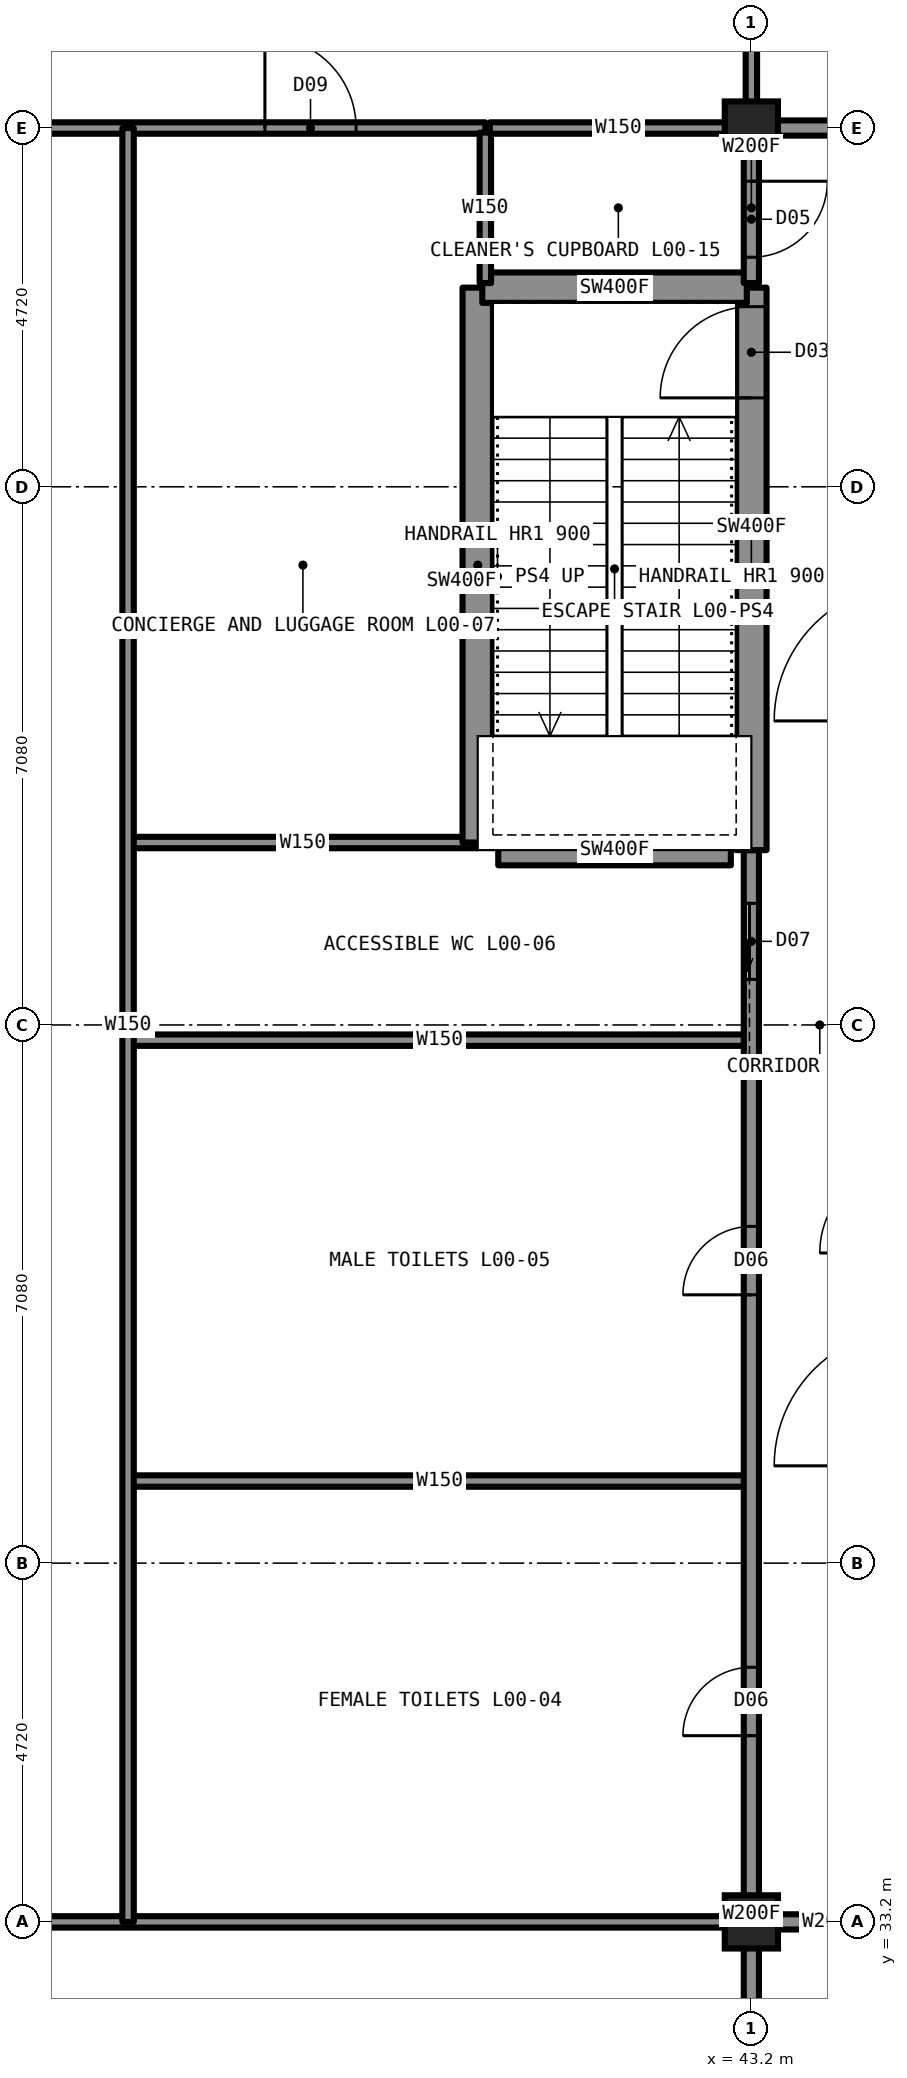
"""IFC4 building model, lengths in metres.
Left out: names, types, materials, properties, quantities, classifications, styles, units other than length and angle.
Written with IfcOpenShell. Run it as: python <this file> out.ifc"""

import sys

from ifc_helpers import new_model, si_unit, direction, frame, frame_2d, origin, origin_2d, place, context, subcontext, project, spatial, rectangle, hollow_rectangle, extrude, element, fill, save


model = new_model("IFC4")
c1 = context("Model", 3, precision=1e-05, world=origin(), true_north=direction((0.0, 1.0)))
c2 = subcontext(c1, "Body", "Model", "MODEL_VIEW")
j1 = project(units=[si_unit("LENGTHUNIT", "METRE"), si_unit("PLANEANGLEUNIT", "RADIAN")], contexts=[c1])
p1 = place(None, origin())
s1 = spatial("IfcSite", under=j1, at=p1, CompositionType="ELEMENT")
p2 = place(p1, origin())
s2 = spatial("IfcBuilding", under=s1, at=p2, CompositionType="ELEMENT")
p3 = place(p2, origin())
s3 = spatial("IfcBuildingStorey", under=s2, at=p3, CompositionType="ELEMENT", Elevation=0.0)
for number, where, z_axis, x_axis in (
    (1, (43.2, 33.2, 0.0), (0.0, 0.0, 1.0), (1.0, 0.0, 0.0)),
    (2, (43.2, 56.8, 0.0), (0.0, 0.0, 1.0), (1.0, 0.0, 0.0)),
):
    element("IfcColumn", number, at=place(p3, frame(where, z_axis=z_axis, x_axis=x_axis)), inside=s3, PredefinedType="COLUMN", context=c2, shape_type="SweptSolid", body=[
        extrude(hollow_rectangle(XDim=0.7, YDim=0.7, WallThickness=0.06, at=origin_2d()), origin(), (0.0, 0.0, 1.0), 5.6),
    ])
p4 = place(p3, frame((35.0, 44.8, 0.0), z_axis=(0.0, 0.0, 1.0), x_axis=(1.0, 0.0, 0.0)))
e3 = element("IfcWall", 3, at=p4, inside=s3, PredefinedType="PARTITIONING", context=c2, shape_type="SweptSolid", body=[
    extrude(rectangle(XDim=8.2, YDim=0.15, at=frame_2d((4.1, 0.0))), origin(), (0.0, 0.0, 1.0), 5.25),
])
p5 = place(p3, frame((43.2, 33.2, 0.0), z_axis=(0.0, 0.0, 1.0), x_axis=(1.0, 0.0, 0.0)))
e4 = element("IfcWall", 4, at=p5, inside=s3, PredefinedType="PARTITIONING", context=c2, shape_type="SweptSolid", body=[
    extrude(rectangle(XDim=2.1, YDim=0.2, at=frame_2d((1.05, 0.0))), origin(), (0.0, 0.0, 1.0), 5.25),
])
p6 = place(p3, frame((23.255, 33.2, 0.0), z_axis=(0.0, 0.0, 1.0), x_axis=(1.0, 0.0, 0.0)))
e5 = element("IfcWall", 5, at=p6, inside=s3, PredefinedType="PARTITIONING", context=c2, shape_type="SweptSolid", body=[
    extrude(rectangle(XDim=19.945, YDim=0.15, at=frame_2d((9.973, 0.0))), origin(), (0.0, 0.0, 1.0), 5.25),
])
p7 = place(p6, frame((4.495, 0.0, 0.0)))
e6 = element("IfcOpeningElement", 6, at=p7, cuts=e5, PredefinedType="OPENING", context=c2, shape_type="SweptSolid", body=[
    extrude(rectangle(XDim=1.6, YDim=2.4, at=frame_2d((0.8, 1.2))), frame((0.0, 0.085, 0.0), z_axis=(0.0, -1.0, 0.0), x_axis=(1.0, 0.0, 0.0)), (0.0, 0.0, 1.0), 0.17),
])
p8 = place(p3, frame((35.0, 39.0, 0.0), z_axis=(0.0, 0.0, 1.0), x_axis=(1.0, 0.0, 0.0)))
e7 = element("IfcWall", 7, at=p8, inside=s3, PredefinedType="PARTITIONING", context=c2, shape_type="SweptSolid", body=[
    extrude(rectangle(XDim=8.2, YDim=0.15, at=frame_2d((4.1, 0.0))), origin(), (0.0, 0.0, 1.0), 5.25),
])
p9 = place(p3, frame((43.2, 56.8, 0.0), z_axis=(0.0, 0.0, 1.0), x_axis=(1.0, 0.0, 0.0)))
e8 = element("IfcWall", 8, at=p9, inside=s3, PredefinedType="PARTITIONING", context=c2, shape_type="SweptSolid", body=[
    extrude(rectangle(XDim=14.1, YDim=0.2, at=frame_2d((7.05, 0.0))), origin(), (0.0, 0.0, 1.0), 5.25),
])
p10 = place(p9, frame((4.9, 0.0, 0.0)))
e9 = element("IfcOpeningElement", 9, at=p10, cuts=e8, PredefinedType="OPENING", context=c2, shape_type="SweptSolid", body=[
    extrude(rectangle(XDim=1.8, YDim=2.2, at=frame_2d((0.9, 1.1))), frame((0.0, 0.11, 0.0), z_axis=(0.0, -1.0, 0.0), x_axis=(1.0, 0.0, 0.0)), (0.0, 0.0, 1.0), 0.22),
])
p11 = place(p3, frame((23.255, 56.8, 0.0), z_axis=(0.0, 0.0, 1.0), x_axis=(1.0, 0.0, 0.0)))
e10 = element("IfcWall", 10, at=p11, inside=s3, PredefinedType="PARTITIONING", context=c2, shape_type="SweptSolid", body=[
    extrude(rectangle(XDim=16.445, YDim=0.15, at=frame_2d((8.223, 0.0))), origin(), (0.0, 0.0, 1.0), 5.25),
])
p12 = place(p11, frame((13.545, 0.0, 0.0)))
e11 = element("IfcOpeningElement", 11, at=p12, cuts=e10, PredefinedType="OPENING", context=c2, shape_type="SweptSolid", body=[
    extrude(rectangle(XDim=1.2, YDim=2.2, at=frame_2d((0.6, 1.1))), frame((0.0, 0.085, 0.0), z_axis=(0.0, -1.0, 0.0), x_axis=(1.0, 0.0, 0.0)), (0.0, 0.0, 1.0), 0.17),
])
p13 = place(p11, frame((4.495, 0.0, 0.0)))
e12 = element("IfcOpeningElement", 12, at=p13, cuts=e10, PredefinedType="OPENING", context=c2, shape_type="SweptSolid", body=[
    extrude(rectangle(XDim=1.6, YDim=2.4, at=frame_2d((0.8, 1.2))), frame((0.0, 0.085, 0.0), z_axis=(0.0, -1.0, 0.0), x_axis=(1.0, 0.0, 0.0)), (0.0, 0.0, 1.0), 0.17),
])
p14 = place(p3, frame((39.87, 47.3, 0.0), z_axis=(0.0, 0.0, 1.0), x_axis=(1.0, 0.0, 0.0)))
e13 = element("IfcWall", 13, at=p14, inside=s3, PredefinedType="SHEAR", context=c2, shape_type="SweptSolid", body=[
    extrude(rectangle(XDim=3.06, YDim=0.4, at=frame_2d((1.53, 0.0))), origin(), (0.0, 0.0, 1.0), 5.6),
])
p15 = place(p3, frame((35.0, 47.4, 0.0), z_axis=(0.0, 0.0, 1.0), x_axis=(1.0, 0.0, 0.0)))
e14 = element("IfcWall", 14, at=p15, inside=s3, PredefinedType="PARTITIONING", context=c2, shape_type="SweptSolid", body=[
    extrude(rectangle(XDim=4.6, YDim=0.15, at=frame_2d((2.3, 0.0))), origin(), (0.0, 0.0, 1.0), 5.25),
])
p16 = place(p3, frame((43.2, 19.3, 0.0), z_axis=(0.0, 0.0, 1.0), x_axis=(0.0, 1.0, 0.0)))
e15 = element("IfcWall", 15, at=p16, inside=s3, PredefinedType="PARTITIONING", context=c2, shape_type="SweptSolid", body=[
    extrude(rectangle(XDim=28.0, YDim=0.2, at=frame_2d((14.0, 0.0))), origin(), (0.0, 0.0, 1.0), 5.25),
])
p17 = place(p16, frame((10.55, 0.0, 0.0)))
e16 = element("IfcOpeningElement", 16, at=p17, cuts=e15, PredefinedType="OPENING", context=c2, shape_type="SweptSolid", body=[
    extrude(rectangle(XDim=1.8, YDim=2.2, at=frame_2d((0.9, 1.1))), frame((0.0, 0.11, 0.0), z_axis=(0.0, -1.0, 0.0), x_axis=(1.0, 0.0, 0.0)), (0.0, 0.0, 1.0), 0.22),
])
p18 = place(p16, frame((26.3, 0.0, 0.0)))
e17 = element("IfcOpeningElement", 17, at=p18, cuts=e15, PredefinedType="OPENING", context=c2, shape_type="SweptSolid", body=[
    extrude(rectangle(XDim=1.0, YDim=2.1, at=frame_2d((0.5, 1.05))), frame((0.0, 0.11, 0.0), z_axis=(0.0, -1.0, 0.0), x_axis=(1.0, 0.0, 0.0)), (0.0, 0.0, 1.0), 0.22),
])
p19 = place(p16, frame((16.35, 0.0, 0.0)))
e18 = element("IfcOpeningElement", 18, at=p19, cuts=e15, PredefinedType="OPENING", context=c2, shape_type="SweptSolid", body=[
    extrude(rectangle(XDim=0.9, YDim=2.1, at=frame_2d((0.45, 1.05))), frame((0.0, 0.11, 0.0), z_axis=(0.0, -1.0, 0.0), x_axis=(1.0, 0.0, 0.0)), (0.0, 0.0, 1.0), 0.22),
])
p20 = place(p16, frame((22.15, 0.0, 0.0)))
e19 = element("IfcOpeningElement", 19, at=p20, cuts=e15, PredefinedType="OPENING", context=c2, shape_type="SweptSolid", body=[
    extrude(rectangle(XDim=0.9, YDim=2.1, at=frame_2d((0.45, 1.05))), frame((0.0, 0.11, 0.0), z_axis=(0.0, -1.0, 0.0), x_axis=(1.0, 0.0, 0.0)), (0.0, 0.0, 1.0), 0.22),
])
p21 = place(p3, frame((43.2, 56.8, 0.0), z_axis=(0.0, 0.0, 1.0), x_axis=(0.0, 1.0, 0.0)))
e20 = element("IfcWall", 20, at=p21, inside=s3, PredefinedType="PARTITIONING", context=c2, shape_type="SweptSolid", body=[
    extrude(rectangle(XDim=13.9, YDim=0.15, at=frame_2d((6.95, 0.0))), origin(), (0.0, 0.0, 1.0), 5.25),
])
p22 = place(p21, frame((6.4, 0.0, 0.0)))
e21 = element("IfcOpeningElement", 21, at=p22, cuts=e20, PredefinedType="OPENING", context=c2, shape_type="SweptSolid", body=[
    extrude(rectangle(XDim=1.6, YDim=2.4, at=frame_2d((0.8, 1.2))), frame((0.0, 0.085, 0.0), z_axis=(0.0, -1.0, 0.0), x_axis=(1.0, 0.0, 0.0)), (0.0, 0.0, 1.0), 0.17),
])
p23 = place(p3, frame((43.2, 47.3, 0.0), z_axis=(0.0, 0.0, 1.0), x_axis=(0.0, 1.0, 0.0)))
e22 = element("IfcWall", 22, at=p23, inside=s3, PredefinedType="SHEAR", context=c2, shape_type="SweptSolid", body=[
    extrude(rectangle(XDim=7.4, YDim=0.4, at=frame_2d((3.7, 0.0))), origin(), (0.0, 0.0, 1.0), 5.6),
])
p24 = place(p23, frame((5.95, 0.0, 0.0)))
e23 = element("IfcOpeningElement", 23, at=p24, cuts=e22, PredefinedType="OPENING", context=c2, shape_type="SweptSolid", body=[
    extrude(rectangle(XDim=1.2, YDim=2.2, at=frame_2d((0.6, 1.1))), frame((0.0, 0.21, 0.0), z_axis=(0.0, -1.0, 0.0), x_axis=(1.0, 0.0, 0.0)), (0.0, 0.0, 1.0), 0.42),
])
p25 = place(p3, frame((39.6, 47.4, 0.0), z_axis=(0.0, 0.0, 1.0), x_axis=(0.0, 1.0, 0.0)))
e24 = element("IfcWall", 24, at=p25, inside=s3, PredefinedType="SHEAR", context=c2, shape_type="SweptSolid", body=[
    extrude(rectangle(XDim=7.3, YDim=0.4, at=frame_2d((3.65, 0.0))), origin(), (0.0, 0.0, 1.0), 5.6),
])
p26 = place(p3, frame((35.0, 33.2, 0.0), z_axis=(0.0, 0.0, 1.0), x_axis=(0.0, 1.0, 0.0)))
e25 = element("IfcWall", 25, at=p26, inside=s3, PredefinedType="PARTITIONING", context=c2, shape_type="SweptSolid", body=[
    extrude(rectangle(XDim=23.6, YDim=0.15, at=frame_2d((11.8, 0.0))), origin(), (0.0, 0.0, 1.0), 5.25),
])
p27 = place(p3, frame((43.14, 54.7, 0.0), z_axis=(0.0, 0.0, 1.0), x_axis=(-1.0, 0.0, 0.0)))
e26 = element("IfcWall", 26, at=p27, inside=s3, PredefinedType="SHEAR", context=c2, shape_type="SweptSolid", body=[
    extrude(rectangle(XDim=3.48, YDim=0.4, at=frame_2d((1.74, 0.0))), origin(), (0.0, 0.0, 1.0), 5.6),
])
p28 = place(p3, frame((43.2, 56.74, 0.0), z_axis=(0.0, 0.0, 1.0), x_axis=(0.0, -1.0, 0.0)))
e27 = element("IfcWall", 27, at=p28, inside=s3, PredefinedType="PARTITIONING", context=c2, shape_type="SweptSolid", body=[
    extrude(rectangle(XDim=1.98, YDim=0.2, at=frame_2d((0.99, 0.0))), origin(), (0.0, 0.0, 1.0), 5.25),
])
p29 = place(p28, frame((0.64, 0.0, 0.0)))
e28 = element("IfcOpeningElement", 28, at=p29, cuts=e27, PredefinedType="OPENING", context=c2, shape_type="SweptSolid", body=[
    extrude(rectangle(XDim=1.0, YDim=2.1, at=frame_2d((0.5, 1.05))), frame((0.0, 0.11, 0.0), z_axis=(0.0, -1.0, 0.0), x_axis=(1.0, 0.0, 0.0)), (0.0, 0.0, 1.0), 0.22),
])
p30 = place(p3, frame((39.7, 54.76, 0.0), z_axis=(0.0, 0.0, 1.0), x_axis=(0.0, 1.0, 0.0)))
e29 = element("IfcWall", 29, at=p30, inside=s3, PredefinedType="PARTITIONING", context=c2, shape_type="SweptSolid", body=[
    extrude(rectangle(XDim=1.98, YDim=0.15, at=frame_2d((0.99, 0.0))), origin(), (0.0, 0.0, 1.0), 5.25),
])
p31 = place(p3, frame((39.76, 56.8, 0.0), z_axis=(0.0, 0.0, 1.0), x_axis=(1.0, 0.0, 0.0)))
e30 = element("IfcWall", 30, at=p31, inside=s3, PredefinedType="PARTITIONING", context=c2, shape_type="SweptSolid", body=[
    extrude(rectangle(XDim=3.38, YDim=0.15, at=frame_2d((1.69, 0.0))), origin(), (0.0, 0.0, 1.0), 5.25),
])
p32 = place(p24, origin())
e31 = element("IfcDoor", 31, at=p32, inside=s3, OperationType="SINGLE_SWING_LEFT", PredefinedType="DOOR", context=c2, shape_type="SweptSolid", body=[
    extrude(rectangle(XDim=1.2, YDim=2.2, at=frame_2d((0.6, 1.1))), frame((0.0, 0.025, 0.0), z_axis=(0.0, -1.0, 0.0), x_axis=(1.0, 0.0, 0.0)), (0.0, 0.0, 1.0), 0.05),
])
fill(e23, e31)
p33 = place(p12, origin())
e32 = element("IfcDoor", 32, at=p33, inside=s3, OperationType="SINGLE_SWING_LEFT", PredefinedType="DOOR", context=c2, shape_type="SweptSolid", body=[
    extrude(rectangle(XDim=1.2, YDim=2.2, at=frame_2d((0.6, 1.1))), frame((0.0, 0.025, 0.0), z_axis=(0.0, -1.0, 0.0), x_axis=(1.0, 0.0, 0.0)), (0.0, 0.0, 1.0), 0.05),
])
fill(e11, e32)
p34 = place(p29, origin())
e33 = element("IfcDoor", 33, at=p34, inside=s3, OperationType="SINGLE_SWING_LEFT", PredefinedType="DOOR", context=c2, shape_type="SweptSolid", body=[
    extrude(rectangle(XDim=1.0, YDim=2.1, at=frame_2d((0.5, 1.05))), frame((0.0, 0.025, 0.0), z_axis=(0.0, -1.0, 0.0), x_axis=(1.0, 0.0, 0.0)), (0.0, 0.0, 1.0), 0.05),
])
fill(e28, e33)
p35 = place(p18, origin())
e34 = element("IfcDoor", 34, at=p35, inside=s3, OperationType="SLIDING_TO_LEFT", PredefinedType="DOOR", context=c2, shape_type="SweptSolid", body=[
    extrude(rectangle(XDim=1.0, YDim=2.1, at=frame_2d((0.5, 1.05))), frame((0.0, 0.025, 0.0), z_axis=(0.0, -1.0, 0.0), x_axis=(1.0, 0.0, 0.0)), (0.0, 0.0, 1.0), 0.05),
])
fill(e17, e34)
p36 = place(p19, origin())
e35 = element("IfcDoor", 35, at=p36, inside=s3, OperationType="SINGLE_SWING_LEFT", PredefinedType="DOOR", context=c2, shape_type="SweptSolid", body=[
    extrude(rectangle(XDim=0.9, YDim=2.1, at=frame_2d((0.45, 1.05))), frame((0.0, 0.025, 0.0), z_axis=(0.0, -1.0, 0.0), x_axis=(1.0, 0.0, 0.0)), (0.0, 0.0, 1.0), 0.05),
])
fill(e18, e35)
p37 = place(p20, origin())
e36 = element("IfcDoor", 36, at=p37, inside=s3, OperationType="SINGLE_SWING_LEFT", PredefinedType="DOOR", context=c2, shape_type="SweptSolid", body=[
    extrude(rectangle(XDim=0.9, YDim=2.1, at=frame_2d((0.45, 1.05))), frame((0.0, 0.025, 0.0), z_axis=(0.0, -1.0, 0.0), x_axis=(1.0, 0.0, 0.0)), (0.0, 0.0, 1.0), 0.05),
])
fill(e19, e36)
save(model, sys.argv[1])
